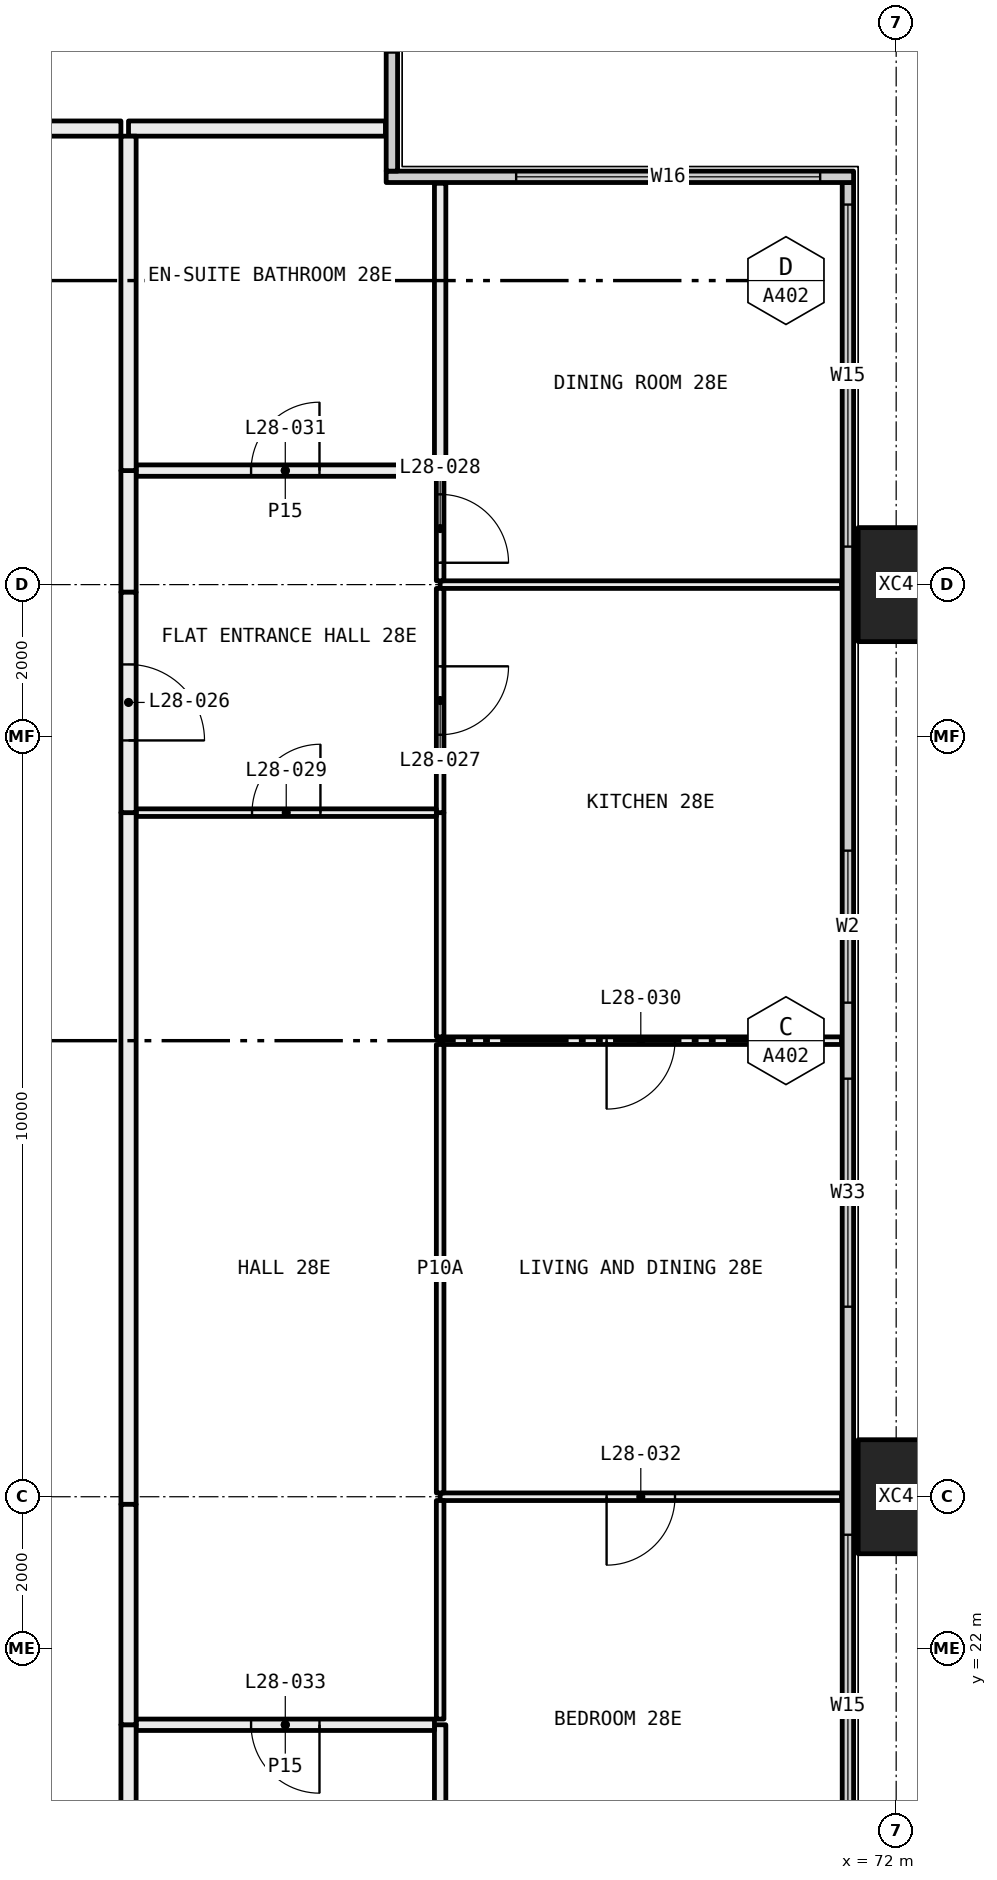
"""IFC4 building model, lengths in metres.
Left out: names, types, materials, properties, quantities, classifications, styles, units other than length and angle.
Written with IfcOpenShell. Run it as: python <this file> out.ifc"""

import sys

from ifc_helpers import new_model, si_unit, direction, frame, frame_2d, origin, origin_2d, place, context, subcontext, project, spatial, rectangle, hollow_rectangle, extrude, element, fill, save


model = new_model("IFC4")
c1 = context("Model", 3, precision=1e-05, world=origin(), true_north=direction((0.0, 1.0)))
c2 = subcontext(c1, "Body", "Model", "MODEL_VIEW")
j1 = project(units=[si_unit("LENGTHUNIT", "METRE"), si_unit("PLANEANGLEUNIT", "RADIAN")], contexts=[c1])
p1 = place(None, origin())
s1 = spatial("IfcSite", under=j1, at=p1, CompositionType="ELEMENT")
p2 = place(p1, origin())
s2 = spatial("IfcBuilding", under=s1, at=p2, CompositionType="ELEMENT")
p3 = place(p2, frame((0.0, 0.0, 110.4)))
s3 = spatial("IfcBuildingStorey", under=s2, at=p3, CompositionType="ELEMENT", Elevation=110.4)
for number, where, z_axis, x_axis in (
    (1, (72.0, 24.0, -0.4), (0.0, 0.0, 1.0), (0.0, 1.0, 0.0)),
    (2, (72.0, 36.0, -0.4), (0.0, 0.0, 1.0), (0.0, 1.0, 0.0)),
):
    element("IfcColumn", number, at=place(p3, frame(where, z_axis=z_axis, x_axis=x_axis)), inside=s3, PredefinedType="COLUMN", context=c2, shape_type="SweptSolid", body=[
        extrude(hollow_rectangle(XDim=1.5, YDim=1.0, WallThickness=0.06, at=origin_2d()), origin(), (0.0, 0.0, 1.0), 3.45),
    ])
p4 = place(p3, frame((71.365, 18.71, 0.0), z_axis=(0.0, 0.0, 1.0), x_axis=(0.0, 1.0, 0.0)))
e3 = element("IfcWall", 3, at=p4, inside=s3, PredefinedType="ELEMENTEDWALL", context=c2, shape_type="SweptSolid", body=[
    extrude(rectangle(XDim=22.58, YDim=0.15, at=frame_2d((11.29, 0.0))), origin(), (0.0, 0.0, 1.0), 3.05),
])
p5 = place(p4, frame((0.29, 0.0, 0.45)))
e4 = element("IfcOpeningElement", 4, at=p5, cuts=e3, PredefinedType="OPENING", context=c2, shape_type="SweptSolid", body=[
    extrude(rectangle(XDim=4.5, YDim=2.55, at=frame_2d((2.25, 1.275))), frame((0.0, 0.085, 0.0), z_axis=(0.0, -1.0, 0.0), x_axis=(1.0, 0.0, 0.0)), (0.0, 0.0, 1.0), 0.17),
])
p6 = place(p4, frame((7.79, 0.0, 0.45)))
e5 = element("IfcOpeningElement", 5, at=p6, cuts=e3, PredefinedType="OPENING", context=c2, shape_type="SweptSolid", body=[
    extrude(rectangle(XDim=3.0, YDim=2.55, at=frame_2d((1.5, 1.275))), frame((0.0, 0.085, 0.0), z_axis=(0.0, -1.0, 0.0), x_axis=(1.0, 0.0, 0.0)), (0.0, 0.0, 1.0), 0.17),
])
p7 = place(p4, frame((11.79, 0.0, 0.45)))
e6 = element("IfcOpeningElement", 6, at=p7, cuts=e3, PredefinedType="OPENING", context=c2, shape_type="SweptSolid", body=[
    extrude(rectangle(XDim=2.0, YDim=2.55, at=frame_2d((1.0, 1.275))), frame((0.0, 0.085, 0.0), z_axis=(0.0, -1.0, 0.0), x_axis=(1.0, 0.0, 0.0)), (0.0, 0.0, 1.0), 0.17),
])
p8 = place(p4, frame((17.79, 0.0, 0.45)))
e7 = element("IfcOpeningElement", 7, at=p8, cuts=e3, PredefinedType="OPENING", context=c2, shape_type="SweptSolid", body=[
    extrude(rectangle(XDim=4.5, YDim=2.55, at=frame_2d((2.25, 1.275))), frame((0.0, 0.085, 0.0), z_axis=(0.0, -1.0, 0.0), x_axis=(1.0, 0.0, 0.0)), (0.0, 0.0, 1.0), 0.17),
])
p9 = place(p3, frame((65.29, 41.365, 0.0), z_axis=(0.0, 0.0, 1.0), x_axis=(1.0, 0.0, 0.0)))
e8 = element("IfcWall", 8, at=p9, inside=s3, PredefinedType="ELEMENTEDWALL", context=c2, shape_type="SweptSolid", body=[
    extrude(rectangle(XDim=6.15, YDim=0.15, at=frame_2d((3.075, 0.0))), origin(), (0.0, 0.0, 1.0), 3.05),
])
p10 = place(p9, frame((1.71, 0.0, 0.45)))
e9 = element("IfcOpeningElement", 9, at=p10, cuts=e8, PredefinedType="OPENING", context=c2, shape_type="SweptSolid", body=[
    extrude(rectangle(XDim=4.0, YDim=2.55, at=frame_2d((2.0, 1.275))), frame((0.0, 0.085, 0.0), z_axis=(0.0, -1.0, 0.0), x_axis=(1.0, 0.0, 0.0)), (0.0, 0.0, 1.0), 0.17),
])
p11 = place(p3, frame((65.365, 41.44, 0.0), z_axis=(0.0, 0.0, 1.0), x_axis=(0.0, 1.0, 0.0)))
e10 = element("IfcWall", 10, at=p11, inside=s3, PredefinedType="ELEMENTEDWALL", context=c2, shape_type="SweptSolid", body=[
    extrude(rectangle(XDim=5.85, YDim=0.15, at=frame_2d((2.925, 0.0))), origin(), (0.0, 0.0, 1.0), 3.05),
])
p12 = place(p11, frame((1.56, 0.0, 0.45)))
e11 = element("IfcOpeningElement", 11, at=p12, cuts=e10, PredefinedType="OPENING", context=c2, shape_type="SweptSolid", body=[
    extrude(rectangle(XDim=4.0, YDim=2.55, at=frame_2d((2.0, 1.275))), frame((0.0, 0.085, 0.0), z_axis=(0.0, -1.0, 0.0), x_axis=(1.0, 0.0, 0.0)), (0.0, 0.0, 1.0), 0.17),
])
p13 = place(p3, frame((71.28, 24.0, 0.0), z_axis=(0.0, 0.0, 1.0), x_axis=(-1.0, 0.0, 0.0)))
e12 = element("IfcWall", 12, at=p13, inside=s3, PredefinedType="PARTITIONING", context=c2, shape_type="SweptSolid", body=[
    extrude(rectangle(XDim=5.28, YDim=0.1, at=frame_2d((2.64, 0.0))), origin(), (0.0, 0.0, 1.0), 2.45),
])
p14 = place(p13, frame((2.19, 0.0, 0.0)))
e13 = element("IfcOpeningElement", 13, at=p14, cuts=e12, PredefinedType="OPENING", context=c2, shape_type="SweptSolid", body=[
    extrude(rectangle(XDim=0.9, YDim=2.1, at=frame_2d((0.45, 1.05))), frame((0.0, 0.06, 0.0), z_axis=(0.0, -1.0, 0.0), x_axis=(1.0, 0.0, 0.0)), (0.0, 0.0, 1.0), 0.12),
])
p15 = place(p3, frame((66.0, 21.0, 0.0), z_axis=(0.0, 0.0, 1.0), x_axis=(0.0, -1.0, 0.0)))
e14 = element("IfcWall", 14, at=p15, inside=s3, PredefinedType="PARTITIONING", context=c2, shape_type="SweptSolid", body=[
    extrude(rectangle(XDim=2.28, YDim=0.15, at=frame_2d((1.14, 0.0))), origin(), (0.0, 0.0, 1.0), 3.05),
])
p16 = place(p3, frame((66.0, 23.95, 0.0), z_axis=(0.0, 0.0, 1.0), x_axis=(0.0, -1.0, 0.0)))
e15 = element("IfcWall", 15, at=p16, inside=s3, PredefinedType="PARTITIONING", context=c2, shape_type="SweptSolid", body=[
    extrude(rectangle(XDim=2.875, YDim=0.1, at=frame_2d((1.438, 0.0))), origin(), (0.0, 0.0, 1.0), 2.45),
])
p17 = place(p3, frame((71.28, 30.0, 0.0), z_axis=(0.0, 0.0, 1.0), x_axis=(-1.0, 0.0, 0.0)))
e16 = element("IfcWall", 16, at=p17, inside=s3, PredefinedType="PARTITIONING", context=c2, shape_type="SweptSolid", body=[
    extrude(rectangle(XDim=5.28, YDim=0.1, at=frame_2d((2.64, 0.0))), origin(), (0.0, 0.0, 1.0), 3.05),
])
p18 = place(p17, frame((2.19, 0.0, 0.0)))
e17 = element("IfcOpeningElement", 17, at=p18, cuts=e16, PredefinedType="OPENING", context=c2, shape_type="SweptSolid", body=[
    extrude(rectangle(XDim=0.9, YDim=2.1, at=frame_2d((0.45, 1.05))), frame((0.0, 0.06, 0.0), z_axis=(0.0, -1.0, 0.0), x_axis=(1.0, 0.0, 0.0)), (0.0, 0.0, 1.0), 0.12),
])
p19 = place(p3, frame((66.0, 29.95, 0.0), z_axis=(0.0, 0.0, 1.0), x_axis=(0.0, -1.0, 0.0)))
e18 = element("IfcWall", 18, at=p19, inside=s3, PredefinedType="PARTITIONING", context=c2, shape_type="SweptSolid", body=[
    extrude(rectangle(XDim=5.9, YDim=0.1, at=frame_2d((2.95, 0.0))), origin(), (0.0, 0.0, 1.0), 2.45),
])
p20 = place(p3, frame((71.28, 36.0, 0.0), z_axis=(0.0, 0.0, 1.0), x_axis=(-1.0, 0.0, 0.0)))
e19 = element("IfcWall", 19, at=p20, inside=s3, PredefinedType="PARTITIONING", context=c2, shape_type="SweptSolid", body=[
    extrude(rectangle(XDim=5.28, YDim=0.1, at=frame_2d((2.64, 0.0))), origin(), (0.0, 0.0, 1.0), 2.45),
])
p21 = place(p3, frame((66.0, 33.0, 0.0), z_axis=(0.0, 0.0, 1.0), x_axis=(0.0, -1.0, 0.0)))
e20 = element("IfcWall", 20, at=p21, inside=s3, PredefinedType="PARTITIONING", context=c2, shape_type="SweptSolid", body=[
    extrude(rectangle(XDim=2.95, YDim=0.1, at=frame_2d((1.475, 0.0))), origin(), (0.0, 0.0, 1.0), 3.05),
])
p22 = place(p3, frame((66.0, 35.95, 0.0), z_axis=(0.0, 0.0, 1.0), x_axis=(0.0, -1.0, 0.0)))
e21 = element("IfcWall", 21, at=p22, inside=s3, PredefinedType="PARTITIONING", context=c2, shape_type="SweptSolid", body=[
    extrude(rectangle(XDim=2.95, YDim=0.1, at=frame_2d((1.475, 0.0))), origin(), (0.0, 0.0, 1.0), 2.45),
])
p23 = place(p22, frame((1.025, 0.0, 0.0)))
e22 = element("IfcOpeningElement", 22, at=p23, cuts=e21, PredefinedType="OPENING", context=c2, shape_type="SweptSolid", body=[
    extrude(rectangle(XDim=0.9, YDim=2.1, at=frame_2d((0.45, 1.05))), frame((0.0, 0.06, 0.0), z_axis=(0.0, -1.0, 0.0), x_axis=(1.0, 0.0, 0.0)), (0.0, 0.0, 1.0), 0.12),
])
p24 = place(p3, frame((66.0, 37.425, 0.0), z_axis=(0.0, 0.0, 1.0), x_axis=(0.0, -1.0, 0.0)))
e23 = element("IfcWall", 23, at=p24, inside=s3, PredefinedType="PARTITIONING", context=c2, shape_type="SweptSolid", body=[
    extrude(rectangle(XDim=1.375, YDim=0.1, at=frame_2d((0.688, 0.0))), origin(), (0.0, 0.0, 1.0), 2.45),
])
p25 = place(p24, frame((0.238, 0.0, 0.0)))
e24 = element("IfcOpeningElement", 24, at=p25, cuts=e23, PredefinedType="OPENING", context=c2, shape_type="SweptSolid", body=[
    extrude(rectangle(XDim=0.9, YDim=2.1, at=frame_2d((0.45, 1.05))), frame((0.0, 0.06, 0.0), z_axis=(0.0, -1.0, 0.0), x_axis=(1.0, 0.0, 0.0)), (0.0, 0.0, 1.0), 0.12),
])
p26 = place(p3, frame((66.0, 41.28, 0.0), z_axis=(0.0, 0.0, 1.0), x_axis=(0.0, -1.0, 0.0)))
e25 = element("IfcWall", 25, at=p26, inside=s3, PredefinedType="PARTITIONING", context=c2, shape_type="SweptSolid", body=[
    extrude(rectangle(XDim=3.78, YDim=0.15, at=frame_2d((1.89, 0.0))), origin(), (0.0, 0.0, 1.0), 3.05),
])
p27 = place(p3, frame((65.925, 21.0, 0.0), z_axis=(0.0, 0.0, 1.0), x_axis=(-1.0, 0.0, 0.0)))
e26 = element("IfcWall", 26, at=p27, inside=s3, PredefinedType="PARTITIONING", context=c2, shape_type="SweptSolid", body=[
    extrude(rectangle(XDim=3.925, YDim=0.15, at=frame_2d((1.962, 0.0))), origin(), (0.0, 0.0, 1.0), 3.05),
])
p28 = place(p27, frame((1.512, 0.0, 0.0)))
e27 = element("IfcOpeningElement", 27, at=p28, cuts=e26, PredefinedType="OPENING", context=c2, shape_type="SweptSolid", body=[
    extrude(rectangle(XDim=0.9, YDim=2.1, at=frame_2d((0.45, 1.05))), frame((0.0, 0.085, 0.0), z_axis=(0.0, -1.0, 0.0), x_axis=(1.0, 0.0, 0.0)), (0.0, 0.0, 1.0), 0.17),
])
p29 = place(p3, frame((61.9, 21.0, 0.0), z_axis=(0.0, 0.0, 1.0), x_axis=(0.0, -1.0, 0.0)))
e28 = element("IfcWall", 28, at=p29, inside=s3, PredefinedType="PARTITIONING", context=c2, shape_type="SweptSolid", body=[
    extrude(rectangle(XDim=2.9, YDim=0.2, at=frame_2d((1.45, 0.0))), origin(), (0.0, 0.0, 1.0), 3.05),
])
p30 = place(p3, frame((65.95, 33.0, 0.0), z_axis=(0.0, 0.0, 1.0), x_axis=(-1.0, 0.0, 0.0)))
e29 = element("IfcWall", 29, at=p30, inside=s3, PredefinedType="PARTITIONING", context=c2, shape_type="SweptSolid", body=[
    extrude(rectangle(XDim=3.95, YDim=0.1, at=frame_2d((1.975, 0.0))), origin(), (0.0, 0.0, 1.0), 3.05),
])
p31 = place(p30, frame((1.525, 0.0, 0.0)))
e30 = element("IfcOpeningElement", 30, at=p31, cuts=e29, PredefinedType="OPENING", context=c2, shape_type="SweptSolid", body=[
    extrude(rectangle(XDim=0.9, YDim=2.1, at=frame_2d((0.45, 1.05))), frame((0.0, 0.06, 0.0), z_axis=(0.0, -1.0, 0.0), x_axis=(1.0, 0.0, 0.0)), (0.0, 0.0, 1.0), 0.12),
])
p32 = place(p3, frame((61.9, 33.0, 0.0), z_axis=(0.0, 0.0, 1.0), x_axis=(0.0, -1.0, 0.0)))
e31 = element("IfcWall", 31, at=p32, inside=s3, PredefinedType="PARTITIONING", context=c2, shape_type="SweptSolid", body=[
    extrude(rectangle(XDim=9.1, YDim=0.2, at=frame_2d((4.55, 0.0))), origin(), (0.0, 0.0, 1.0), 2.45),
])
p33 = place(p3, frame((61.9, 23.9, 0.0), z_axis=(0.0, 0.0, 1.0), x_axis=(0.0, -1.0, 0.0)))
e32 = element("IfcWall", 32, at=p33, inside=s3, PredefinedType="PARTITIONING", context=c2, shape_type="SweptSolid", body=[
    extrude(rectangle(XDim=2.9, YDim=0.2, at=frame_2d((1.45, 0.0))), origin(), (0.0, 0.0, 1.0), 3.05),
])
p34 = place(p3, frame((65.925, 37.5, 0.0), z_axis=(0.0, 0.0, 1.0), x_axis=(-1.0, 0.0, 0.0)))
e33 = element("IfcWall", 33, at=p34, inside=s3, PredefinedType="PARTITIONING", context=c2, shape_type="SweptSolid", body=[
    extrude(rectangle(XDim=3.925, YDim=0.15, at=frame_2d((1.962, 0.0))), origin(), (0.0, 0.0, 1.0), 3.05),
])
p35 = place(p34, frame((1.512, 0.0, 0.0)))
e34 = element("IfcOpeningElement", 34, at=p35, cuts=e33, PredefinedType="OPENING", context=c2, shape_type="SweptSolid", body=[
    extrude(rectangle(XDim=0.9, YDim=2.1, at=frame_2d((0.45, 1.05))), frame((0.0, 0.085, 0.0), z_axis=(0.0, -1.0, 0.0), x_axis=(1.0, 0.0, 0.0)), (0.0, 0.0, 1.0), 0.17),
])
p36 = place(p3, frame((61.9, 37.5, 0.0), z_axis=(0.0, 0.0, 1.0), x_axis=(0.0, -1.0, 0.0)))
e35 = element("IfcWall", 35, at=p36, inside=s3, PredefinedType="PARTITIONING", context=c2, shape_type="SweptSolid", body=[
    extrude(rectangle(XDim=1.6, YDim=0.2, at=frame_2d((0.8, 0.0))), origin(), (0.0, 0.0, 1.0), 2.45),
])
p37 = place(p3, frame((61.9, 35.9, 0.0), z_axis=(0.0, 0.0, 1.0), x_axis=(0.0, -1.0, 0.0)))
e36 = element("IfcWall", 36, at=p37, inside=s3, PredefinedType="PARTITIONING", context=c2, shape_type="SweptSolid", body=[
    extrude(rectangle(XDim=2.9, YDim=0.2, at=frame_2d((1.45, 0.0))), origin(), (0.0, 0.0, 1.0), 3.05),
])
p38 = place(p37, frame((0.95, 0.0, 0.0)))
e37 = element("IfcOpeningElement", 37, at=p38, cuts=e36, PredefinedType="OPENING", context=c2, shape_type="SweptSolid", body=[
    extrude(rectangle(XDim=1.0, YDim=2.1, at=frame_2d((0.5, 1.05))), frame((0.0, 0.11, 0.0), z_axis=(0.0, -1.0, 0.0), x_axis=(1.0, 0.0, 0.0)), (0.0, 0.0, 1.0), 0.22),
])
p39 = place(p3, frame((65.28, 42.0, 0.0), z_axis=(0.0, 0.0, 1.0), x_axis=(-1.0, 0.0, 0.0)))
e38 = element("IfcWall", 38, at=p39, inside=s3, PredefinedType="PARTITIONING", context=c2, shape_type="SweptSolid", body=[
    extrude(rectangle(XDim=3.38, YDim=0.2, at=frame_2d((1.69, 0.0))), origin(), (0.0, 0.0, 1.0), 3.05),
])
p40 = place(p3, frame((61.9, 41.9, 0.0), z_axis=(0.0, 0.0, 1.0), x_axis=(0.0, -1.0, 0.0)))
e39 = element("IfcWall", 39, at=p40, inside=s3, PredefinedType="PARTITIONING", context=c2, shape_type="SweptSolid", body=[
    extrude(rectangle(XDim=4.4, YDim=0.2, at=frame_2d((2.2, 0.0))), origin(), (0.0, 0.0, 1.0), 3.05),
])
p41 = place(p3, frame((60.0, 42.0, 0.0), z_axis=(0.0, 0.0, 1.0), x_axis=(1.0, 0.0, 0.0)))
e40 = element("IfcWall", 40, at=p41, inside=s3, PredefinedType="PARTITIONING", context=c2, shape_type="SweptSolid", body=[
    extrude(rectangle(XDim=1.8, YDim=0.2, at=frame_2d((0.9, 0.0))), origin(), (0.0, 0.0, 1.0), 3.05),
])
p42 = place(p5, origin())
e41 = element("IfcWindow", 41, at=p42, inside=s3, PartitioningType="SINGLE_PANEL", PredefinedType="WINDOW", context=c2, shape_type="SweptSolid", body=[
    extrude(rectangle(XDim=4.5, YDim=2.55, at=frame_2d((2.25, 1.275))), frame((0.0, 0.03, 0.0), z_axis=(0.0, -1.0, 0.0), x_axis=(1.0, 0.0, 0.0)), (0.0, 0.0, 1.0), 0.06),
])
fill(e4, e41)
p43 = place(p6, origin())
e42 = element("IfcWindow", 42, at=p43, inside=s3, PartitioningType="SINGLE_PANEL", PredefinedType="WINDOW", context=c2, shape_type="SweptSolid", body=[
    extrude(rectangle(XDim=3.0, YDim=2.55, at=frame_2d((1.5, 1.275))), frame((0.0, 0.03, 0.0), z_axis=(0.0, -1.0, 0.0), x_axis=(1.0, 0.0, 0.0)), (0.0, 0.0, 1.0), 0.06),
])
fill(e5, e42)
p44 = place(p7, origin())
e43 = element("IfcWindow", 43, at=p44, inside=s3, PartitioningType="SINGLE_PANEL", PredefinedType="WINDOW", context=c2, shape_type="SweptSolid", body=[
    extrude(rectangle(XDim=2.0, YDim=2.55, at=frame_2d((1.0, 1.275))), frame((0.0, 0.03, 0.0), z_axis=(0.0, -1.0, 0.0), x_axis=(1.0, 0.0, 0.0)), (0.0, 0.0, 1.0), 0.06),
])
fill(e6, e43)
p45 = place(p8, origin())
e44 = element("IfcWindow", 44, at=p45, inside=s3, PartitioningType="SINGLE_PANEL", PredefinedType="WINDOW", context=c2, shape_type="SweptSolid", body=[
    extrude(rectangle(XDim=4.5, YDim=2.55, at=frame_2d((2.25, 1.275))), frame((0.0, 0.03, 0.0), z_axis=(0.0, -1.0, 0.0), x_axis=(1.0, 0.0, 0.0)), (0.0, 0.0, 1.0), 0.06),
])
fill(e7, e44)
p46 = place(p10, origin())
e45 = element("IfcWindow", 45, at=p46, inside=s3, PartitioningType="SINGLE_PANEL", PredefinedType="WINDOW", context=c2, shape_type="SweptSolid", body=[
    extrude(rectangle(XDim=4.0, YDim=2.55, at=frame_2d((2.0, 1.275))), frame((0.0, 0.03, 0.0), z_axis=(0.0, -1.0, 0.0), x_axis=(1.0, 0.0, 0.0)), (0.0, 0.0, 1.0), 0.06),
])
fill(e9, e45)
p47 = place(p38, origin())
e46 = element("IfcDoor", 46, at=p47, inside=s3, OperationType="SINGLE_SWING_LEFT", PredefinedType="DOOR", context=c2, shape_type="SweptSolid", body=[
    extrude(rectangle(XDim=1.0, YDim=2.1, at=frame_2d((0.5, 1.05))), frame((0.0, 0.025, 0.0), z_axis=(0.0, -1.0, 0.0), x_axis=(1.0, 0.0, 0.0)), (0.0, 0.0, 1.0), 0.05),
])
fill(e37, e46)
p48 = place(p23, origin())
e47 = element("IfcDoor", 47, at=p48, inside=s3, OperationType="SINGLE_SWING_RIGHT", PredefinedType="DOOR", context=c2, shape_type="SweptSolid", body=[
    extrude(rectangle(XDim=0.9, YDim=2.1, at=frame_2d((0.45, 1.05))), frame((0.0, 0.025, 0.0), z_axis=(0.0, -1.0, 0.0), x_axis=(1.0, 0.0, 0.0)), (0.0, 0.0, 1.0), 0.05),
])
fill(e22, e47)
p49 = place(p25, origin())
e48 = element("IfcDoor", 48, at=p49, inside=s3, OperationType="SINGLE_SWING_LEFT", PredefinedType="DOOR", context=c2, shape_type="SweptSolid", body=[
    extrude(rectangle(XDim=0.9, YDim=2.1, at=frame_2d((0.45, 1.05))), frame((0.0, 0.025, 0.0), z_axis=(0.0, -1.0, 0.0), x_axis=(1.0, 0.0, 0.0)), (0.0, 0.0, 1.0), 0.05),
])
fill(e24, e48)
p50 = place(p31, frame((0.9, 0.0, 0.0), x_axis=(-1.0, 0.0, 0.0)))
e49 = element("IfcDoor", 49, at=p50, inside=s3, OperationType="SINGLE_SWING_LEFT", PredefinedType="DOOR", context=c2, shape_type="SweptSolid", body=[
    extrude(rectangle(XDim=0.9, YDim=2.1, at=frame_2d((0.45, 1.05))), frame((0.0, 0.025, 0.0), z_axis=(0.0, -1.0, 0.0), x_axis=(1.0, 0.0, 0.0)), (0.0, 0.0, 1.0), 0.05),
])
fill(e30, e49)
p51 = place(p18, origin())
e50 = element("IfcDoor", 50, at=p51, inside=s3, OperationType="SINGLE_SWING_LEFT", PredefinedType="DOOR", context=c2, shape_type="SweptSolid", body=[
    extrude(rectangle(XDim=0.9, YDim=2.1, at=frame_2d((0.45, 1.05))), frame((0.0, 0.025, 0.0), z_axis=(0.0, -1.0, 0.0), x_axis=(1.0, 0.0, 0.0)), (0.0, 0.0, 1.0), 0.05),
])
fill(e17, e50)
p52 = place(p35, frame((0.9, 0.0, 0.0), x_axis=(-1.0, 0.0, 0.0)))
e51 = element("IfcDoor", 51, at=p52, inside=s3, OperationType="SINGLE_SWING_LEFT", PredefinedType="DOOR", context=c2, shape_type="SweptSolid", body=[
    extrude(rectangle(XDim=0.9, YDim=2.1, at=frame_2d((0.45, 1.05))), frame((0.0, 0.025, 0.0), z_axis=(0.0, -1.0, 0.0), x_axis=(1.0, 0.0, 0.0)), (0.0, 0.0, 1.0), 0.05),
])
fill(e34, e51)
p53 = place(p14, origin())
e52 = element("IfcDoor", 52, at=p53, inside=s3, OperationType="SINGLE_SWING_LEFT", PredefinedType="DOOR", context=c2, shape_type="SweptSolid", body=[
    extrude(rectangle(XDim=0.9, YDim=2.1, at=frame_2d((0.45, 1.05))), frame((0.0, 0.025, 0.0), z_axis=(0.0, -1.0, 0.0), x_axis=(1.0, 0.0, 0.0)), (0.0, 0.0, 1.0), 0.05),
])
fill(e13, e52)
p54 = place(p28, origin())
e53 = element("IfcDoor", 53, at=p54, inside=s3, OperationType="SINGLE_SWING_RIGHT", PredefinedType="DOOR", context=c2, shape_type="SweptSolid", body=[
    extrude(rectangle(XDim=0.9, YDim=2.1, at=frame_2d((0.45, 1.05))), frame((0.0, 0.025, 0.0), z_axis=(0.0, -1.0, 0.0), x_axis=(1.0, 0.0, 0.0)), (0.0, 0.0, 1.0), 0.05),
])
fill(e27, e53)
save(model, sys.argv[1])
